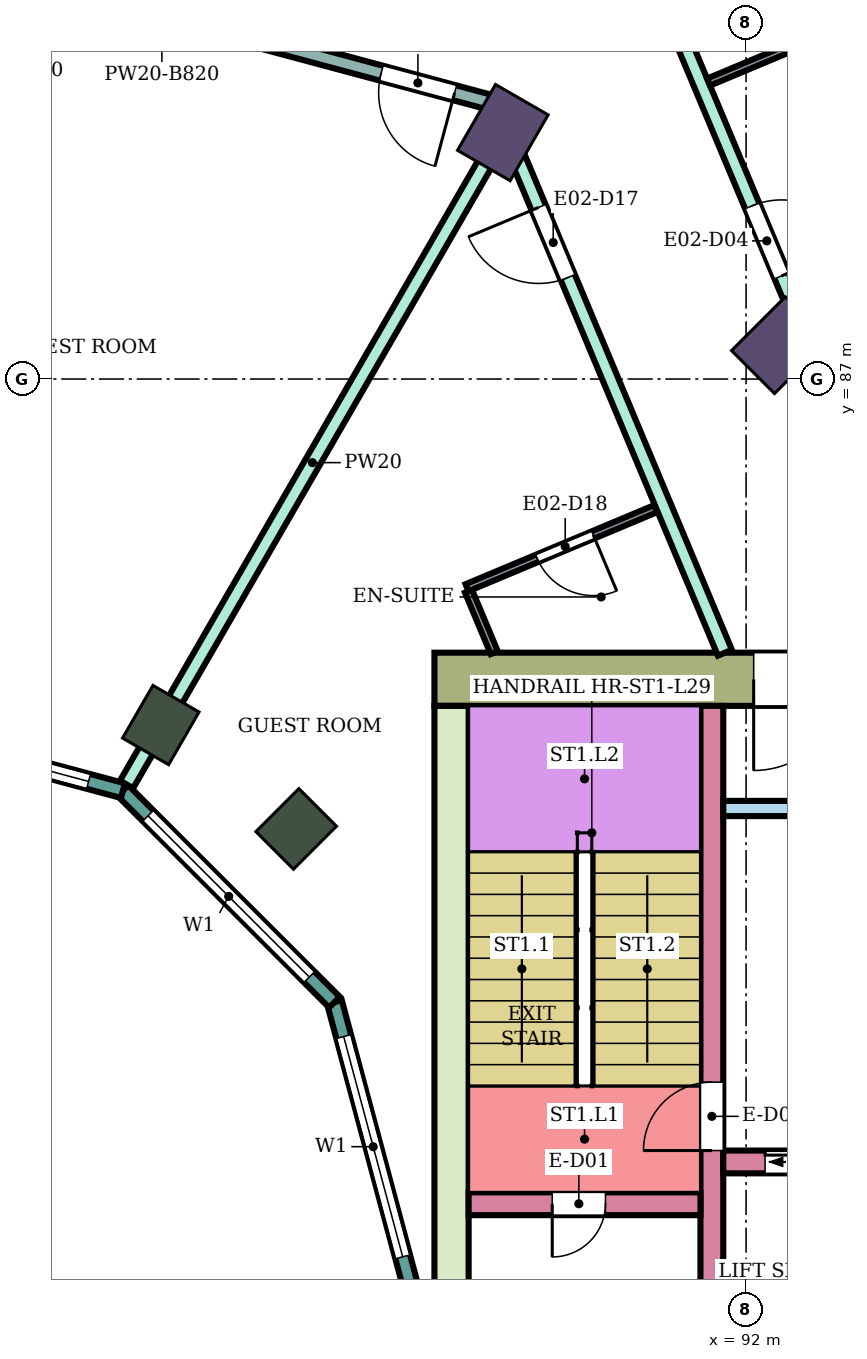
"""IFC4 building model, lengths in metres.
Left out: names, types, materials, properties, quantities, classifications, styles, units other than length and angle.
Written with IfcOpenShell. Run it as: python <this file> out.ifc"""

import sys

from ifc_helpers import new_model, si_unit, direction, frame, frame_2d, origin, origin_2d, place, context, subcontext, project, spatial, rectangle, extrude, element, fill, save


model = new_model("IFC4")
c1 = context("Model", 3, precision=1e-05, world=origin(), true_north=direction((0.0, 1.0)))
c2 = subcontext(c1, "Body", "Model", "MODEL_VIEW")
j1 = project(units=[si_unit("LENGTHUNIT", "METRE"), si_unit("PLANEANGLEUNIT", "RADIAN")], contexts=[c1])
p1 = place(None, origin())
s1 = spatial("IfcSite", under=j1, at=p1, CompositionType="ELEMENT")
p2 = place(p1, origin())
s2 = spatial("IfcBuilding", under=s1, at=p2, CompositionType="ELEMENT")
p3 = place(p2, frame((0.0, 0.0, 126.3)))
s3 = spatial("IfcBuildingStorey", under=s2, at=p3, CompositionType="ELEMENT", Elevation=126.3)
for number, where, z_axis, x_axis in (
    (1, (92.445, 87.445, 0.0), (0.0, 0.0, 1.0), (0.707, 0.707, 0.0)),
    (2, (88.8, 90.242, 0.0), (0.0, 0.0, 1.0), (0.5, 0.866, 0.0)),
):
    element("IfcColumn", number, at=place(p3, frame(where, z_axis=z_axis, x_axis=x_axis)), inside=s3, PredefinedType="COLUMN", context=c2, shape_type="SweptSolid", body=[
        extrude(rectangle(XDim=1.0, YDim=0.8, at=origin_2d()), origin(), (0.0, 0.0, 1.0), 3.9),
    ])
for number, where, z_axis, x_axis in (
    (3, (86.081, 81.081, 0.0), (0.0, 0.0, 1.0), (0.707, 0.707, 0.0)),
    (4, (84.3, 82.448, 0.0), (0.0, 0.0, 1.0), (0.5, 0.866, 0.0)),
):
    element("IfcColumn", number, at=place(p3, frame(where, z_axis=z_axis, x_axis=x_axis)), inside=s3, PredefinedType="COLUMN", context=c2, shape_type="SweptSolid", body=[
        extrude(rectangle(XDim=0.8, YDim=0.7, at=origin_2d()), origin(), (0.0, 0.0, 1.0), 3.9),
    ])
p4 = place(p3, frame((87.9, 83.05, 0.0), z_axis=(0.0, 0.0, 1.0), x_axis=(1.0, 0.0, 0.0)))
e5 = element("IfcWall", 5, at=p4, inside=s3, PredefinedType="SHEAR", context=c2, shape_type="SweptSolid", body=[
    extrude(rectangle(XDim=14.8, YDim=0.7, at=frame_2d((7.4, 0.0))), origin(), (0.0, 0.0, 1.0), 3.58),
])
p5 = place(p4, frame((4.2, 0.0, 0.0)))
e6 = element("IfcOpeningElement", 6, at=p5, cuts=e5, PredefinedType="OPENING", context=c2, shape_type="SweptSolid", body=[
    extrude(rectangle(XDim=2.4, YDim=2.4, at=frame_2d((1.2, 1.2))), frame((0.0, 0.36, 0.0), z_axis=(0.0, -1.0, 0.0), x_axis=(1.0, 0.0, 0.0)), (0.0, 0.0, 1.0), 0.72),
])
p6 = place(p3, frame((88.125, 75.0, 0.0), z_axis=(0.0, 0.0, 1.0), x_axis=(0.0, 1.0, 0.0)))
e7 = element("IfcWall", 7, at=p6, inside=s3, PredefinedType="SHEAR", context=c2, shape_type="SweptSolid", body=[
    extrude(rectangle(XDim=7.7, YDim=0.45, at=frame_2d((3.85, 0.0))), origin(), (0.0, 0.0, 1.0), 3.58),
])
p7 = place(p3, frame((91.55, 75.0, 0.0), z_axis=(0.0, 0.0, 1.0), x_axis=(0.0, 1.0, 0.0)))
e8 = element("IfcWall", 8, at=p7, inside=s3, PredefinedType="SHEAR", context=c2, shape_type="SweptSolid", body=[
    extrude(rectangle(XDim=7.7, YDim=0.3, at=frame_2d((3.85, 0.0))), origin(), (0.0, 0.0, 1.0), 3.58),
])
p8 = place(p7, frame((1.85, 0.0, 0.0)))
e9 = element("IfcOpeningElement", 9, at=p8, cuts=e8, PredefinedType="OPENING", context=c2, shape_type="SweptSolid", body=[
    extrude(rectangle(XDim=0.9, YDim=2.1, at=frame_2d((0.45, 1.05))), frame((0.0, 0.16, 0.0), z_axis=(0.0, -1.0, 0.0), x_axis=(1.0, 0.0, 0.0)), (0.0, 0.0, 1.0), 0.32),
])
p9 = place(p3, frame((88.35, 76.15, 0.0), z_axis=(0.0, 0.0, 1.0), x_axis=(1.0, 0.0, 0.0)))
e10 = element("IfcWall", 10, at=p9, inside=s3, PredefinedType="SHEAR", context=c2, shape_type="SweptSolid", body=[
    extrude(rectangle(XDim=3.05, YDim=0.3, at=frame_2d((1.525, 0.0))), origin(), (0.0, 0.0, 1.0), 3.58),
])
p10 = place(p9, frame((1.1, 0.0, 0.0)))
e11 = element("IfcOpeningElement", 11, at=p10, cuts=e10, PredefinedType="OPENING", context=c2, shape_type="SweptSolid", body=[
    extrude(rectangle(XDim=0.7, YDim=2.0, at=frame_2d((0.35, 1.0))), frame((0.0, 0.16, 0.0), z_axis=(0.0, -1.0, 0.0), x_axis=(1.0, 0.0, 0.0)), (0.0, 0.0, 1.0), 0.32),
])
p11 = place(p3, frame((91.7, 76.7, 0.0), z_axis=(0.0, 0.0, 1.0), x_axis=(1.0, 0.0, 0.0)))
e12 = element("IfcWall", 12, at=p11, inside=s3, PredefinedType="SHEAR", context=c2, shape_type="SweptSolid", body=[
    extrude(rectangle(XDim=11.0, YDim=0.3, at=frame_2d((5.5, 0.0))), origin(), (0.0, 0.0, 1.0), 3.58),
])
p12 = place(p11, frame((0.55, 0.0, 0.0)))
e13 = element("IfcOpeningElement", 13, at=p12, cuts=e12, PredefinedType="OPENING", context=c2, shape_type="SweptSolid", body=[
    extrude(rectangle(XDim=1.1, YDim=2.1, at=frame_2d((0.55, 1.05))), frame((0.0, 0.16, 0.0), z_axis=(0.0, -1.0, 0.0), x_axis=(1.0, 0.0, 0.0)), (0.0, 0.0, 1.0), 0.32),
])
p13 = place(p11, frame((8.1, 0.0, 0.0)))
e14 = element("IfcOpeningElement", 14, at=p13, cuts=e12, PredefinedType="OPENING", context=c2, shape_type="SweptSolid", body=[
    extrude(rectangle(XDim=1.0, YDim=2.1, at=frame_2d((0.5, 1.05))), frame((0.0, 0.16, 0.0), z_axis=(0.0, -1.0, 0.0), x_axis=(1.0, 0.0, 0.0)), (0.0, 0.0, 1.0), 0.32),
])
p14 = place(p3, frame((91.7, 81.35, 0.0), z_axis=(0.0, 0.0, 1.0), x_axis=(1.0, 0.0, 0.0)))
e15 = element("IfcWall", 15, at=p14, inside=s3, PredefinedType="SHEAR", context=c2, shape_type="SweptSolid", body=[
    extrude(rectangle(XDim=4.5, YDim=0.2, at=frame_2d((2.25, 0.0))), origin(), (0.0, 0.0, 1.0), 3.58),
])
p15 = place(p3, frame((87.604, 75.0, 0.0), z_axis=(0.0, 0.0, 1.0), x_axis=(-0.258789828301, 0.965933654434, 0.0)))
e16 = element("IfcWall", 16, at=p15, inside=s3, PredefinedType="NOTDEFINED", context=c2, shape_type="SweptSolid", body=[
    extrude(rectangle(XDim=3.936, YDim=0.2, at=frame_2d((1.968, 0.0))), origin(), (0.0, 0.0, 1.0), 3.9),
])
p16 = place(p15, frame((0.468, 0.0, 0.9)))
e17 = element("IfcOpeningElement", 17, at=p16, cuts=e16, PredefinedType="OPENING", context=c2, shape_type="SweptSolid", body=[
    extrude(rectangle(XDim=3.0, YDim=2.3, at=frame_2d((1.5, 1.15))), frame((0.0, 0.11, 0.0), z_axis=(0.0, -1.0, 0.0), x_axis=(1.0, 0.0, 0.0)), (0.0, 0.0, 1.0), 0.22),
])
p17 = place(p3, frame((86.585, 78.802, 0.0), z_axis=(0.0, 0.0, 1.0), x_axis=(-0.707106781187, 0.707106781187, 0.0)))
e18 = element("IfcWall", 18, at=p17, inside=s3, PredefinedType="NOTDEFINED", context=c2, shape_type="SweptSolid", body=[
    extrude(rectangle(XDim=3.936, YDim=0.2, at=frame_2d((1.968, 0.0))), origin(), (0.0, 0.0, 1.0), 3.9),
])
p18 = place(p17, frame((0.468, 0.0, 0.9)))
e19 = element("IfcOpeningElement", 19, at=p18, cuts=e18, PredefinedType="OPENING", context=c2, shape_type="SweptSolid", body=[
    extrude(rectangle(XDim=3.0, YDim=2.3, at=frame_2d((1.5, 1.15))), frame((0.0, 0.11, 0.0), z_axis=(0.0, -1.0, 0.0), x_axis=(1.0, 0.0, 0.0)), (0.0, 0.0, 1.0), 0.22),
])
p19 = place(p3, frame((83.802, 81.585, 0.0), z_axis=(0.0, 0.0, 1.0), x_axis=(-0.965933654434, 0.258789828301, 0.0)))
e20 = element("IfcWall", 20, at=p19, inside=s3, PredefinedType="NOTDEFINED", context=c2, shape_type="SweptSolid", body=[
    extrude(rectangle(XDim=3.936, YDim=0.2, at=frame_2d((1.968, 0.0))), origin(), (0.0, 0.0, 1.0), 3.9),
])
p20 = place(p19, frame((0.468, 0.0, 0.9)))
e21 = element("IfcOpeningElement", 21, at=p20, cuts=e20, PredefinedType="OPENING", context=c2, shape_type="SweptSolid", body=[
    extrude(rectangle(XDim=3.0, YDim=2.3, at=frame_2d((1.5, 1.15))), frame((0.0, 0.11, 0.0), z_axis=(0.0, -1.0, 0.0), x_axis=(1.0, 0.0, 0.0)), (0.0, 0.0, 1.0), 0.22),
])
p21 = place(p3, frame((80.0, 92.954, 0.0), z_axis=(0.0, 0.0, 1.0), x_axis=(0.96592536278, -0.258820774936, 0.0)))
e22 = element("IfcWall", 22, at=p21, inside=s3, PredefinedType="PARTITIONING", context=c2, shape_type="SweptSolid", body=[
    extrude(rectangle(XDim=8.934, YDim=0.2, at=frame_2d((4.467, 0.0))), origin(), (0.0, 0.0, 1.0), 3.08),
])
p22 = place(p21, frame((7.454, 0.0, 0.0)))
e23 = element("IfcOpeningElement", 23, at=p22, cuts=e22, PredefinedType="OPENING", context=c2, shape_type="SweptSolid", body=[
    extrude(rectangle(XDim=1.0, YDim=2.1, at=frame_2d((0.5, 1.05))), frame((0.0, 0.11, 0.0), z_axis=(0.0, -1.0, 0.0), x_axis=(1.0, 0.0, 0.0)), (0.0, 0.0, 1.0), 0.22),
])
p23 = place(p3, frame((83.85, 81.667, 0.0), z_axis=(0.0, 0.0, 1.0), x_axis=(0.500092047414, 0.865972253663, 0.0)))
e24 = element("IfcWall", 24, at=p23, inside=s3, PredefinedType="PARTITIONING", context=c2, shape_type="SweptSolid", body=[
    extrude(rectangle(XDim=9.778, YDim=0.2, at=frame_2d((4.889, 0.0))), origin(), (0.0, 0.0, 1.0), 3.45),
])
p24 = place(p3, frame((88.698, 90.624, 0.0), z_axis=(0.0, 0.0, 1.0), x_axis=(0.386027055918, -0.922487459047, 0.0)))
e25 = element("IfcWall", 25, at=p24, inside=s3, PredefinedType="PARTITIONING", context=c2, shape_type="SweptSolid", body=[
    extrude(rectangle(XDim=7.832, YDim=0.2, at=frame_2d((3.916, 0.0))), origin(), (0.0, 0.0, 1.0), 3.45),
])
p25 = place(p24, frame((1.482, 0.0, 0.0)))
e26 = element("IfcOpeningElement", 26, at=p25, cuts=e25, PredefinedType="OPENING", context=c2, shape_type="SweptSolid", body=[
    extrude(rectangle(XDim=1.0, YDim=2.1, at=frame_2d((0.5, 1.05))), frame((0.0, 0.11, 0.0), z_axis=(0.0, -1.0, 0.0), x_axis=(1.0, 0.0, 0.0)), (0.0, 0.0, 1.0), 0.22),
])
p26 = place(p3, frame((90.604, 92.805, 0.0), z_axis=(0.0, 0.0, 1.0), x_axis=(0.386199042801, -0.922415470024, 0.0)))
e27 = element("IfcWall", 27, at=p26, inside=s3, PredefinedType="PARTITIONING", context=c2, shape_type="SweptSolid", body=[
    extrude(rectangle(XDim=8.48, YDim=0.2, at=frame_2d((4.24, 0.0))), origin(), (0.0, 0.0, 1.0), 3.45),
])
p27 = place(p26, frame((3.823, 0.0, 0.0)))
e28 = element("IfcOpeningElement", 28, at=p27, cuts=e27, PredefinedType="OPENING", context=c2, shape_type="SweptSolid", body=[
    extrude(rectangle(XDim=1.0, YDim=2.1, at=frame_2d((0.5, 1.05))), frame((0.0, 0.11, 0.0), z_axis=(0.0, -1.0, 0.0), x_axis=(1.0, 0.0, 0.0)), (0.0, 0.0, 1.0), 0.22),
])
p28 = place(p3, frame((88.348, 84.209, 0.0), z_axis=(0.0, 0.0, 1.0), x_axis=(0.386077497504, -0.922466349479, 0.0)))
e29 = element("IfcWall", 29, at=p28, inside=s3, PredefinedType="PARTITIONING", context=c2, shape_type="SweptSolid", body=[
    extrude(rectangle(XDim=0.877, YDim=0.1, at=frame_2d((0.438, 0.0))), origin(), (0.0, 0.0, 1.0), 3.45),
])
p29 = place(p3, frame((88.329, 84.255, 0.0), z_axis=(0.0, 0.0, 1.0), x_axis=(0.922320663728, 0.386425404522, 0.0)))
e30 = element("IfcWall", 30, at=p29, inside=s3, PredefinedType="PARTITIONING", context=c2, shape_type="SweptSolid", body=[
    extrude(rectangle(XDim=2.69, YDim=0.1, at=frame_2d((1.345, 0.0))), origin(), (0.0, 0.0, 1.0), 3.45),
])
p30 = place(p29, frame((1.0, 0.0, 0.0)))
e31 = element("IfcOpeningElement", 31, at=p30, cuts=e30, PredefinedType="OPENING", context=c2, shape_type="SweptSolid", body=[
    extrude(rectangle(XDim=0.8, YDim=2.1, at=frame_2d((0.4, 1.05))), frame((0.0, 0.06, 0.0), z_axis=(0.0, -1.0, 0.0), x_axis=(1.0, 0.0, 0.0)), (0.0, 0.0, 1.0), 0.12),
])
p31 = place(p3, frame((91.507, 90.907, 0.0), z_axis=(0.0, 0.0, 1.0), x_axis=(0.922344808264, 0.38636777126, 0.0)))
e32 = element("IfcWall", 32, at=p31, inside=s3, PredefinedType="PARTITIONING", context=c2, shape_type="SweptSolid", body=[
    extrude(rectangle(XDim=2.65, YDim=0.1, at=frame_2d((1.325, 0.0))), origin(), (0.0, 0.0, 1.0), 3.45),
])
p32 = place(p16, origin())
e33 = element("IfcWindow", 33, at=p32, inside=s3, PartitioningType="SINGLE_PANEL", PredefinedType="WINDOW", context=c2, shape_type="SweptSolid", body=[
    extrude(rectangle(XDim=3.0, YDim=2.3, at=frame_2d((1.5, 1.15))), frame((0.0, 0.03, 0.0), z_axis=(0.0, -1.0, 0.0), x_axis=(1.0, 0.0, 0.0)), (0.0, 0.0, 1.0), 0.06),
])
fill(e17, e33)
p33 = place(p18, origin())
e34 = element("IfcWindow", 34, at=p33, inside=s3, PartitioningType="SINGLE_PANEL", PredefinedType="WINDOW", context=c2, shape_type="SweptSolid", body=[
    extrude(rectangle(XDim=3.0, YDim=2.3, at=frame_2d((1.5, 1.15))), frame((0.0, 0.03, 0.0), z_axis=(0.0, -1.0, 0.0), x_axis=(1.0, 0.0, 0.0)), (0.0, 0.0, 1.0), 0.06),
])
fill(e19, e34)
p34 = place(p20, origin())
e35 = element("IfcWindow", 35, at=p34, inside=s3, PartitioningType="SINGLE_PANEL", PredefinedType="WINDOW", context=c2, shape_type="SweptSolid", body=[
    extrude(rectangle(XDim=3.0, YDim=2.3, at=frame_2d((1.5, 1.15))), frame((0.0, 0.03, 0.0), z_axis=(0.0, -1.0, 0.0), x_axis=(1.0, 0.0, 0.0)), (0.0, 0.0, 1.0), 0.06),
])
fill(e21, e35)
p35 = place(p27, origin())
e36 = element("IfcDoor", 36, at=p35, inside=s3, OperationType="SINGLE_SWING_RIGHT", PredefinedType="DOOR", context=c2, shape_type="SweptSolid", body=[
    extrude(rectangle(XDim=1.0, YDim=2.1, at=frame_2d((0.5, 1.05))), frame((0.0, 0.025, 0.0), z_axis=(0.0, -1.0, 0.0), x_axis=(1.0, 0.0, 0.0)), (0.0, 0.0, 1.0), 0.05),
])
fill(e28, e36)
p36 = place(p25, frame((1.0, 0.0, 0.0), z_axis=(0.0, 0.0, 1.0), x_axis=(-1.0, 0.0, 0.0)))
e37 = element("IfcDoor", 37, at=p36, inside=s3, OperationType="SINGLE_SWING_RIGHT", PredefinedType="DOOR", context=c2, shape_type="SweptSolid", body=[
    extrude(rectangle(XDim=1.0, YDim=2.1, at=frame_2d((0.5, 1.05))), frame((0.0, 0.025, 0.0), z_axis=(0.0, -1.0, 0.0), x_axis=(1.0, 0.0, 0.0)), (0.0, 0.0, 1.0), 0.05),
])
fill(e26, e37)
p37 = place(p30, frame((0.8, 0.0, 0.0), z_axis=(0.0, 0.0, 1.0), x_axis=(-1.0, 0.0, 0.0)))
e38 = element("IfcDoor", 38, at=p37, inside=s3, OperationType="SINGLE_SWING_LEFT", PredefinedType="DOOR", context=c2, shape_type="SweptSolid", body=[
    extrude(rectangle(XDim=0.8, YDim=2.1, at=frame_2d((0.4, 1.05))), frame((0.0, 0.025, 0.0), z_axis=(0.0, -1.0, 0.0), x_axis=(1.0, 0.0, 0.0)), (0.0, 0.0, 1.0), 0.05),
])
fill(e31, e38)
p38 = place(p22, frame((1.0, 0.0, 0.0), z_axis=(0.0, 0.0, 1.0), x_axis=(-1.0, 0.0, 0.0)))
e39 = element("IfcDoor", 39, at=p38, inside=s3, OperationType="SINGLE_SWING_LEFT", PredefinedType="DOOR", context=c2, shape_type="SweptSolid", body=[
    extrude(rectangle(XDim=1.0, YDim=2.1, at=frame_2d((0.5, 1.05))), frame((0.0, 0.025, 0.0), z_axis=(0.0, -1.0, 0.0), x_axis=(1.0, 0.0, 0.0)), (0.0, 0.0, 1.0), 0.05),
])
fill(e23, e39)
p39 = place(p10, frame((0.7, 0.0, 0.0), z_axis=(0.0, 0.0, 1.0), x_axis=(-1.0, 0.0, 0.0)))
e40 = element("IfcDoor", 40, at=p39, inside=s3, OperationType="SINGLE_SWING_RIGHT", PredefinedType="DOOR", context=c2, shape_type="SweptSolid", body=[
    extrude(rectangle(XDim=0.7, YDim=2.0, at=frame_2d((0.35, 1.0))), frame((0.0, 0.025, 0.0), z_axis=(0.0, -1.0, 0.0), x_axis=(1.0, 0.0, 0.0)), (0.0, 0.0, 1.0), 0.05),
])
fill(e11, e40)
p40 = place(p8, origin())
e41 = element("IfcDoor", 41, at=p40, inside=s3, OperationType="SINGLE_SWING_LEFT", PredefinedType="DOOR", context=c2, shape_type="SweptSolid", body=[
    extrude(rectangle(XDim=0.9, YDim=2.1, at=frame_2d((0.45, 1.05))), frame((0.0, 0.025, 0.0), z_axis=(0.0, -1.0, 0.0), x_axis=(1.0, 0.0, 0.0)), (0.0, 0.0, 1.0), 0.05),
])
fill(e9, e41)
p41 = place(p12, origin())
e42 = element("IfcDoor", 42, at=p41, inside=s3, OperationType="DOUBLE_DOOR_SLIDING", PredefinedType="DOOR", context=c2, shape_type="SweptSolid", body=[
    extrude(rectangle(XDim=1.1, YDim=2.1, at=frame_2d((0.55, 1.05))), frame((0.0, 0.025, 0.0), z_axis=(0.0, -1.0, 0.0), x_axis=(1.0, 0.0, 0.0)), (0.0, 0.0, 1.0), 0.05),
])
fill(e13, e42)
p42 = place(p5, frame((2.4, 0.0, 0.0), z_axis=(0.0, 0.0, 1.0), x_axis=(-1.0, 0.0, 0.0)))
e43 = element("IfcDoor", 43, at=p42, inside=s3, OperationType="DOUBLE_DOOR_SINGLE_SWING", PredefinedType="DOOR", context=c2, shape_type="SweptSolid", body=[
    extrude(rectangle(XDim=2.4, YDim=2.4, at=frame_2d((1.2, 1.2))), frame((0.0, 0.025, 0.0), z_axis=(0.0, -1.0, 0.0), x_axis=(1.0, 0.0, 0.0)), (0.0, 0.0, 1.0), 0.05),
])
fill(e6, e43)
save(model, sys.argv[1])
